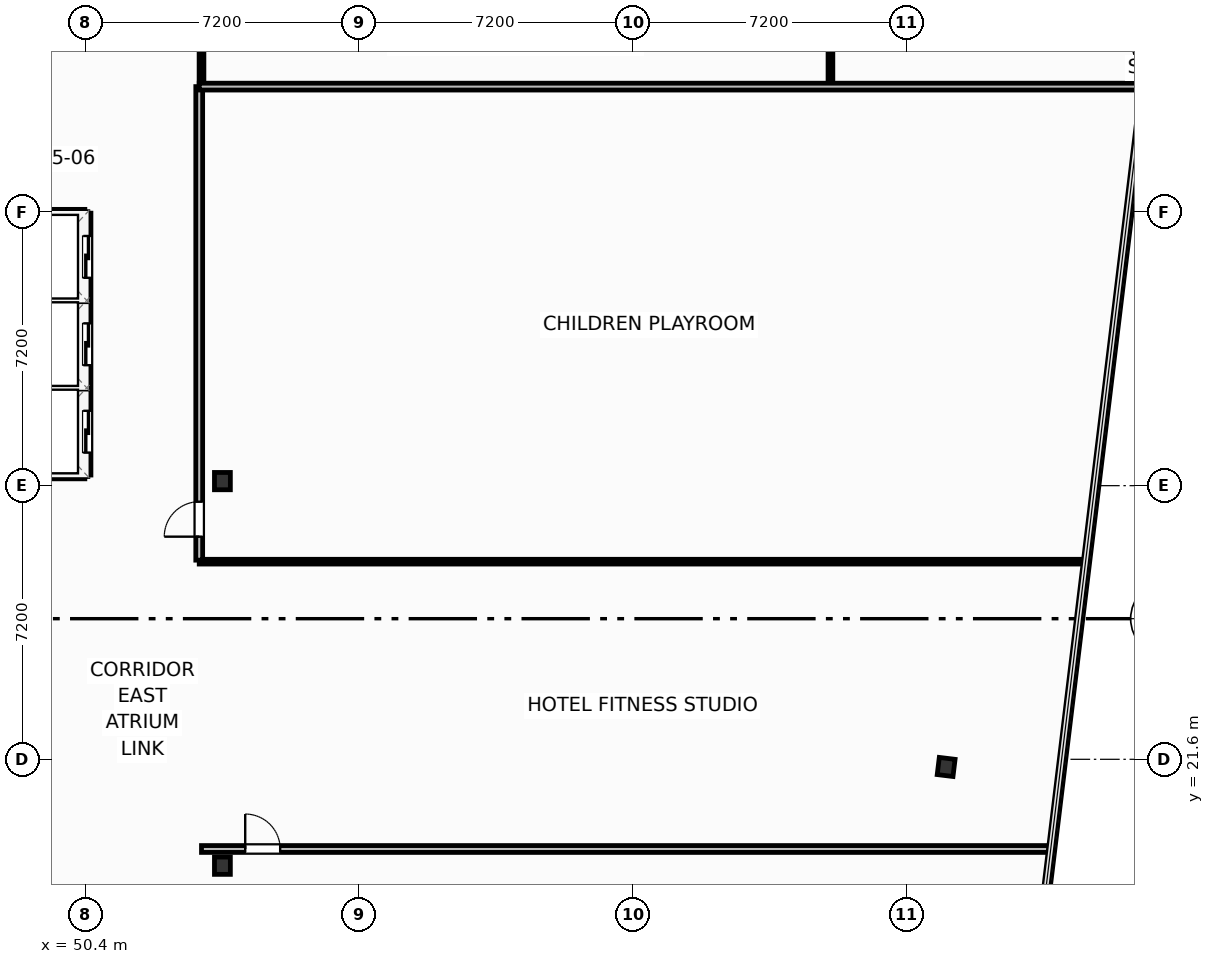
"""IFC4 building model, lengths in metres.
Left out: names, types, materials, properties, quantities, classifications, styles, units other than length and angle.
Written with IfcOpenShell. Run it as: python <this file> out.ifc"""

import sys

from ifc_helpers import new_model, si_unit, direction, frame, frame_2d, origin, origin_2d, place, context, subcontext, project, spatial, rectangle, i_section, extrude, element, fill, save


model = new_model("IFC4")
c1 = context("Model", 3, precision=1e-05, world=origin(), true_north=direction((0.0, 1.0)))
c2 = subcontext(c1, "Body", "Model", "MODEL_VIEW")
j1 = project(units=[si_unit("LENGTHUNIT", "METRE"), si_unit("PLANEANGLEUNIT", "RADIAN")], contexts=[c1])
p1 = place(None, origin())
s1 = spatial("IfcSite", under=j1, at=p1, CompositionType="ELEMENT")
p2 = place(p1, origin())
s2 = spatial("IfcBuilding", under=s1, at=p2, CompositionType="ELEMENT")
p3 = place(p2, frame((0.0, 0.0, 147.6)))
s3 = spatial("IfcBuildingStorey", under=s2, at=p3, CompositionType="ELEMENT", Elevation=147.6)
for number, where, z_axis, x_axis in (
    (1, (54.0, 18.8, 0.0), (0.0, 0.0, 1.0), (1.0, 0.0, 0.0)),
    (2, (54.0, 28.92, 0.0), (0.0, 0.0, 1.0), (1.0, 0.0, 0.0)),
    (3, (73.044, 21.399, 0.0), (0.0, 0.0, 1.0), (0.993, -0.12, 0.0)),
):
    element("IfcColumn", number, at=place(p3, frame(where, z_axis=z_axis, x_axis=x_axis)), inside=s3, PredefinedType="COLUMN", context=c2, shape_type="SweptSolid", body=[
        extrude(i_section(OverallWidth=0.418, OverallDepth=0.455, WebThickness=0.042, FlangeThickness=0.068, FilletRadius=0.025, at=origin_2d()), origin(), (0.0, 0.0, 1.0), 3.7),
    ])
p4 = place(p3, frame((78.155, 40.109, 0.0), z_axis=(0.0, 0.0, 1.0), x_axis=(-0.268639368869, 0.963240826322, 0.0)))
e4 = element("IfcWall", 4, at=p4, inside=s3, PredefinedType="SOLIDWALL", context=c2, shape_type="SweptSolid", body=[
    extrude(rectangle(XDim=1.353, YDim=0.22, at=frame_2d((0.677, 0.0))), origin(), (0.0, 0.0, 1.0), 2.73),
])
for number, where, z_axis, x_axis in (
    (5, (53.45, 39.3, 0.0), (0.0, 0.0, 1.0), (0.0, 1.0, 0.0)),
    (6, (70.0, 39.3, 0.0), (0.0, 0.0, 1.0), (0.0, 1.0, 0.0)),
):
    element("IfcWall", number, at=place(p3, frame(where, z_axis=z_axis, x_axis=x_axis)), inside=s3, PredefinedType="PARTITIONING", context=c2, shape_type="SweptSolid", body=[
        extrude(rectangle(XDim=2.31, YDim=0.125, at=frame_2d((1.155, 0.0))), origin(), (0.0, 0.0, 1.0), 3.45),
    ])
p5 = place(p3, frame((53.45, 19.24, 0.0), z_axis=(0.0, 0.0, 1.0), x_axis=(1.0, 0.0, 0.0)))
e7 = element("IfcWall", 7, at=p5, inside=s3, PredefinedType="PARTITIONING", context=c2, shape_type="SweptSolid", body=[
    extrude(rectangle(XDim=22.307, YDim=0.18, at=frame_2d((11.153, 0.0))), origin(), (0.0, 0.0, 1.0), 2.662),
])
p6 = place(p5, frame((1.15, 0.0, 0.0)))
e8 = element("IfcOpeningElement", 8, at=p6, cuts=e7, PredefinedType="OPENING", context=c2, shape_type="SweptSolid", body=[
    extrude(rectangle(XDim=0.92, YDim=2.05, at=frame_2d((0.46, 1.025))), frame((0.0, 0.1, 0.0), z_axis=(0.0, -1.0, 0.0), x_axis=(1.0, 0.0, 0.0)), (0.0, 0.0, 1.0), 0.2),
])
p7 = place(p3, frame((53.39, 26.8, 0.0), z_axis=(0.0, 0.0, 1.0), x_axis=(1.0, 0.0, 0.0)))
e9 = element("IfcWall", 9, at=p7, inside=s3, PredefinedType="PARTITIONING", context=c2, shape_type="SweptSolid", body=[
    extrude(rectangle(XDim=23.283, YDim=0.125, at=frame_2d((11.642, 0.0))), origin(), (0.0, 0.0, 1.0), 3.45),
])
p8 = place(p3, frame((53.39, 26.84, 0.0), z_axis=(0.0, 0.0, 1.0), x_axis=(0.0, 1.0, 0.0)))
e10 = element("IfcWall", 10, at=p8, inside=s3, PredefinedType="PARTITIONING", context=c2, shape_type="SweptSolid", body=[
    extrude(rectangle(XDim=12.46, YDim=0.18, at=frame_2d((6.23, 0.0))), origin(), (0.0, 0.0, 1.0), 3.45),
])
p9 = place(p8, frame((0.618, 0.0, 0.0)))
e11 = element("IfcOpeningElement", 11, at=p9, cuts=e10, PredefinedType="OPENING", context=c2, shape_type="SweptSolid", body=[
    extrude(rectangle(XDim=0.92, YDim=2.05, at=frame_2d((0.46, 1.025))), frame((0.0, 0.1, 0.0), z_axis=(0.0, -1.0, 0.0), x_axis=(1.0, 0.0, 0.0)), (0.0, 0.0, 1.0), 0.2),
])
p10 = place(p3, frame((53.39, 39.3, 0.0), z_axis=(0.0, 0.0, 1.0), x_axis=(1.0, 0.0, 0.0)))
e12 = element("IfcWall", 12, at=p10, inside=s3, PredefinedType="PARTITIONING", context=c2, shape_type="SweptSolid", body=[
    extrude(rectangle(XDim=24.74, YDim=0.18, at=frame_2d((12.37, 0.0))), origin(), (0.0, 0.0, 1.0), 3.45),
])
for number, where, z_axis, x_axis in (
    (13, (48.32, 31.375, 0.0), (0.0, 0.0, 1.0), (1.0, 0.0, 0.0)),
    (14, (48.32, 33.675, 0.0), (0.0, 0.0, 1.0), (1.0, 0.0, 0.0)),
):
    element("IfcWall", number, at=place(p3, frame(where, z_axis=z_axis, x_axis=x_axis)), inside=s3, PredefinedType="PARTITIONING", context=c2, shape_type="SweptSolid", body=[
        extrude(rectangle(XDim=2.06, YDim=0.2, at=frame_2d((1.03, 0.0))), origin(), (0.0, 0.0, 1.0), 3.45),
    ])
p11 = place(p3, frame((48.32, 29.08, 0.0), z_axis=(0.0, 0.0, 1.0), x_axis=(1.0, 0.0, 0.0)))
e15 = element("IfcWall", 15, at=p11, inside=s3, PredefinedType="PARTITIONING", context=c2, shape_type="SweptSolid", body=[
    extrude(rectangle(XDim=2.06, YDim=0.2, at=frame_2d((1.03, 0.0))), origin(), (0.0, 0.0, 1.0), 2.662),
])
p12 = place(p3, frame((48.32, 35.97, 0.0), z_axis=(0.0, 0.0, 1.0), x_axis=(1.0, 0.0, 0.0)))
e16 = element("IfcWall", 16, at=p12, inside=s3, PredefinedType="PARTITIONING", context=c2, shape_type="SweptSolid", body=[
    extrude(rectangle(XDim=2.06, YDim=0.2, at=frame_2d((1.03, 0.0))), origin(), (0.0, 0.0, 1.0), 3.45),
])
p13 = place(p3, frame((50.44, 29.08, 0.0), z_axis=(0.0, 0.0, 1.0), x_axis=(0.0, 1.0, 0.0)))
e17 = element("IfcWall", 17, at=p13, inside=s3, PredefinedType="PARTITIONING", context=c2, shape_type="SweptSolid", body=[
    extrude(rectangle(XDim=6.89, YDim=0.2, at=frame_2d((3.445, 0.0))), origin(), (0.0, 0.0, 1.0), 3.45),
])
p14 = place(p13, frame((0.59, 0.0, 0.0)))
e18 = element("IfcOpeningElement", 18, at=p14, cuts=e17, PredefinedType="OPENING", context=c2, shape_type="SweptSolid", body=[
    extrude(rectangle(XDim=1.1, YDim=2.15, at=frame_2d((0.55, 1.075))), frame((0.0, 0.11, 0.0), z_axis=(0.0, -1.0, 0.0), x_axis=(1.0, 0.0, 0.0)), (0.0, 0.0, 1.0), 0.22),
])
p15 = place(p13, frame((2.89, 0.0, 0.0)))
e19 = element("IfcOpeningElement", 19, at=p15, cuts=e17, PredefinedType="OPENING", context=c2, shape_type="SweptSolid", body=[
    extrude(rectangle(XDim=1.1, YDim=2.15, at=frame_2d((0.55, 1.075))), frame((0.0, 0.11, 0.0), z_axis=(0.0, -1.0, 0.0), x_axis=(1.0, 0.0, 0.0)), (0.0, 0.0, 1.0), 0.22),
])
p16 = place(p13, frame((5.19, 0.0, 0.0)))
e20 = element("IfcOpeningElement", 20, at=p16, cuts=e17, PredefinedType="OPENING", context=c2, shape_type="SweptSolid", body=[
    extrude(rectangle(XDim=1.1, YDim=2.15, at=frame_2d((0.55, 1.075))), frame((0.0, 0.11, 0.0), z_axis=(0.0, -1.0, 0.0), x_axis=(1.0, 0.0, 0.0)), (0.0, 0.0, 1.0), 0.22),
])
p17 = place(p6, origin())
e21 = element("IfcDoor", 21, at=p17, inside=s3, OperationType="SINGLE_SWING_LEFT", PredefinedType="DOOR", context=c2, shape_type="SweptSolid", body=[
    extrude(rectangle(XDim=0.92, YDim=2.05, at=frame_2d((0.46, 1.025))), frame((0.0, 0.025, 0.0), z_axis=(0.0, -1.0, 0.0), x_axis=(1.0, 0.0, 0.0)), (0.0, 0.0, 1.0), 0.05),
])
fill(e8, e21)
p18 = place(p9, origin())
e22 = element("IfcDoor", 22, at=p18, inside=s3, OperationType="SINGLE_SWING_LEFT", PredefinedType="DOOR", context=c2, shape_type="SweptSolid", body=[
    extrude(rectangle(XDim=0.92, YDim=2.05, at=frame_2d((0.46, 1.025))), frame((0.0, 0.025, 0.0), z_axis=(0.0, -1.0, 0.0), x_axis=(1.0, 0.0, 0.0)), (0.0, 0.0, 1.0), 0.05),
])
fill(e11, e22)
p19 = place(p14, origin())
e23 = element("IfcDoor", 23, at=p19, inside=s3, OperationType="SLIDING_TO_LEFT", PredefinedType="DOOR", context=c2, shape_type="SweptSolid", body=[
    extrude(rectangle(XDim=1.1, YDim=2.15, at=frame_2d((0.55, 1.075))), frame((0.0, 0.025, 0.0), z_axis=(0.0, -1.0, 0.0), x_axis=(1.0, 0.0, 0.0)), (0.0, 0.0, 1.0), 0.05),
])
fill(e18, e23)
p20 = place(p15, origin())
e24 = element("IfcDoor", 24, at=p20, inside=s3, OperationType="SLIDING_TO_LEFT", PredefinedType="DOOR", context=c2, shape_type="SweptSolid", body=[
    extrude(rectangle(XDim=1.1, YDim=2.15, at=frame_2d((0.55, 1.075))), frame((0.0, 0.025, 0.0), z_axis=(0.0, -1.0, 0.0), x_axis=(1.0, 0.0, 0.0)), (0.0, 0.0, 1.0), 0.05),
])
fill(e19, e24)
p21 = place(p16, origin())
e25 = element("IfcDoor", 25, at=p21, inside=s3, OperationType="SLIDING_TO_LEFT", PredefinedType="DOOR", context=c2, shape_type="SweptSolid", body=[
    extrude(rectangle(XDim=1.1, YDim=2.15, at=frame_2d((0.55, 1.075))), frame((0.0, 0.025, 0.0), z_axis=(0.0, -1.0, 0.0), x_axis=(1.0, 0.0, 0.0)), (0.0, 0.0, 1.0), 0.05),
])
fill(e20, e25)
save(model, sys.argv[1])
